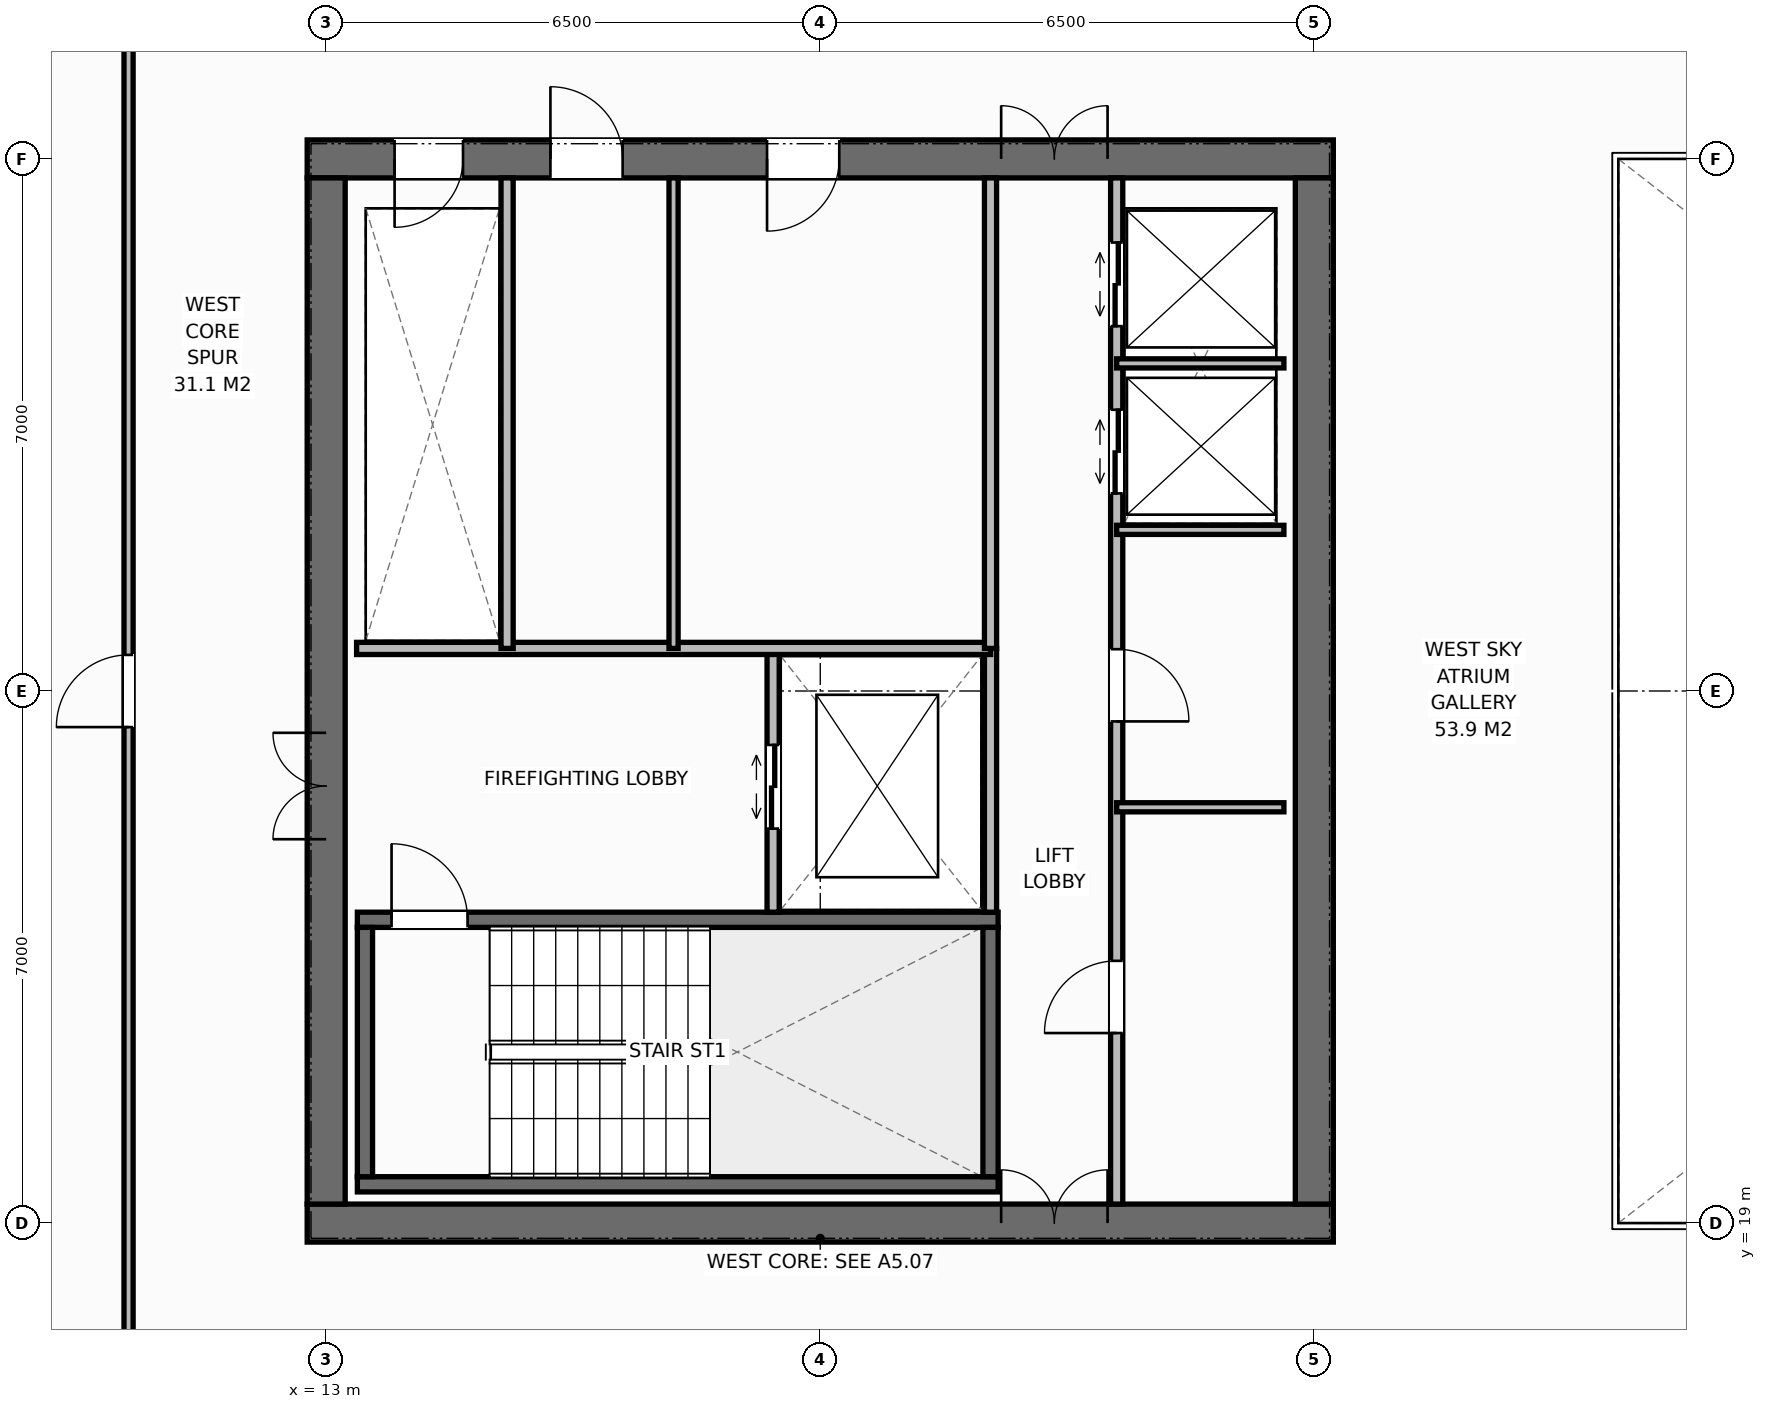
"""IFC4 building model, lengths in metres.
Left out: names, types, materials, properties, quantities, classifications, styles, units other than length and angle.
Written with IfcOpenShell. Run it as: python <this file> out.ifc"""

import sys

from ifc_helpers import new_model, si_unit, direction, frame, frame_2d, origin, place, context, subcontext, project, spatial, rectangle, extrude, element, fill, save


model = new_model("IFC4")
c1 = context("Model", 3, precision=1e-05, world=origin(), true_north=direction((0.0, 1.0)))
c2 = subcontext(c1, "Body", "Model", "MODEL_VIEW")
j1 = project(units=[si_unit("LENGTHUNIT", "METRE"), si_unit("PLANEANGLEUNIT", "RADIAN")], contexts=[c1])
p1 = place(None, origin())
s1 = spatial("IfcSite", under=j1, at=p1, CompositionType="ELEMENT")
p2 = place(p1, origin())
s2 = spatial("IfcBuilding", under=s1, at=p2, CompositionType="ELEMENT")
p3 = place(p2, frame((0.0, 0.0, 206.2)))
s3 = spatial("IfcBuildingStorey", under=s2, at=p3, CompositionType="ELEMENT", Elevation=206.2)
p4 = place(p3, frame((12.75, 19.0, 0.0), z_axis=(0.0, 0.0, 1.0), x_axis=(1.0, 0.0, 0.0)))
e1 = element("IfcWall", 1, at=p4, inside=s3, PredefinedType="SHEAR", context=c2, shape_type="SweptSolid", body=[
    extrude(rectangle(XDim=13.5, YDim=0.5, at=frame_2d((6.75, 0.0))), origin(), (0.0, 0.0, 1.0), 3.8),
])
p5 = place(p4, frame((9.13, 0.0, 0.0)))
e2 = element("IfcOpeningElement", 2, at=p5, cuts=e1, PredefinedType="OPENING", context=c2, shape_type="SweptSolid", body=[
    extrude(rectangle(XDim=1.4, YDim=2.2, at=frame_2d((0.7, 1.1))), frame((0.0, 0.26, 0.0), z_axis=(0.0, -1.0, 0.0), x_axis=(1.0, 0.0, 0.0)), (0.0, 0.0, 1.0), 0.52),
])
p6 = place(p3, frame((12.75, 33.0, 0.0), z_axis=(0.0, 0.0, 1.0), x_axis=(1.0, 0.0, 0.0)))
e3 = element("IfcWall", 3, at=p6, inside=s3, PredefinedType="SHEAR", context=c2, shape_type="SweptSolid", body=[
    extrude(rectangle(XDim=13.5, YDim=0.5, at=frame_2d((6.75, 0.0))), origin(), (0.0, 0.0, 1.0), 3.8),
])
p7 = place(p6, frame((1.15, 0.0, 0.0)))
e4 = element("IfcOpeningElement", 4, at=p7, cuts=e3, PredefinedType="OPENING", context=c2, shape_type="SweptSolid", body=[
    extrude(rectangle(XDim=0.9, YDim=2.15, at=frame_2d((0.45, 1.075))), frame((0.0, 0.26, 0.0), z_axis=(0.0, -1.0, 0.0), x_axis=(1.0, 0.0, 0.0)), (0.0, 0.0, 1.0), 0.52),
])
p8 = place(p6, frame((3.2, 0.0, 0.0)))
e5 = element("IfcOpeningElement", 5, at=p8, cuts=e3, PredefinedType="OPENING", context=c2, shape_type="SweptSolid", body=[
    extrude(rectangle(XDim=0.95, YDim=2.15, at=frame_2d((0.475, 1.075))), frame((0.0, 0.26, 0.0), z_axis=(0.0, -1.0, 0.0), x_axis=(1.0, 0.0, 0.0)), (0.0, 0.0, 1.0), 0.52),
])
p9 = place(p6, frame((6.05, 0.0, 0.0)))
e6 = element("IfcOpeningElement", 6, at=p9, cuts=e3, PredefinedType="OPENING", context=c2, shape_type="SweptSolid", body=[
    extrude(rectangle(XDim=0.95, YDim=2.15, at=frame_2d((0.475, 1.075))), frame((0.0, 0.26, 0.0), z_axis=(0.0, -1.0, 0.0), x_axis=(1.0, 0.0, 0.0)), (0.0, 0.0, 1.0), 0.52),
])
p10 = place(p6, frame((9.13, 0.0, 0.0)))
e7 = element("IfcOpeningElement", 7, at=p10, cuts=e3, PredefinedType="OPENING", context=c2, shape_type="SweptSolid", body=[
    extrude(rectangle(XDim=1.4, YDim=2.2, at=frame_2d((0.7, 1.1))), frame((0.0, 0.26, 0.0), z_axis=(0.0, -1.0, 0.0), x_axis=(1.0, 0.0, 0.0)), (0.0, 0.0, 1.0), 0.52),
])
p11 = place(p3, frame((13.0, 19.25, 0.0), z_axis=(0.0, 0.0, 1.0), x_axis=(0.0, 1.0, 0.0)))
e8 = element("IfcWall", 8, at=p11, inside=s3, PredefinedType="SHEAR", context=c2, shape_type="SweptSolid", body=[
    extrude(rectangle(XDim=13.5, YDim=0.5, at=frame_2d((6.75, 0.0))), origin(), (0.0, 0.0, 1.0), 3.8),
])
p12 = place(p11, frame((4.8, 0.0, 0.0)))
e9 = element("IfcOpeningElement", 9, at=p12, cuts=e8, PredefinedType="OPENING", context=c2, shape_type="SweptSolid", body=[
    extrude(rectangle(XDim=1.4, YDim=2.2, at=frame_2d((0.7, 1.1))), frame((0.0, 0.26, 0.0), z_axis=(0.0, -1.0, 0.0), x_axis=(1.0, 0.0, 0.0)), (0.0, 0.0, 1.0), 0.52),
])
p13 = place(p3, frame((26.0, 19.25, 0.0), z_axis=(0.0, 0.0, 1.0), x_axis=(0.0, 1.0, 0.0)))
e10 = element("IfcWall", 10, at=p13, inside=s3, PredefinedType="SHEAR", context=c2, shape_type="SweptSolid", body=[
    extrude(rectangle(XDim=13.5, YDim=0.5, at=frame_2d((6.75, 0.0))), origin(), (0.0, 0.0, 1.0), 3.8),
])
p14 = place(p3, frame((13.41, 19.51, 0.0), z_axis=(0.0, 0.0, 1.0), x_axis=(1.0, 0.0, 0.0)))
e11 = element("IfcWall", 11, at=p14, inside=s3, PredefinedType="SHEAR", context=c2, shape_type="SweptSolid", body=[
    extrude(rectangle(XDim=8.43, YDim=0.2, at=frame_2d((4.215, 0.0))), origin(), (0.0, 0.0, 1.0), 3.8),
])
p15 = place(p3, frame((13.41, 22.99, 0.0), z_axis=(0.0, 0.0, 1.0), x_axis=(1.0, 0.0, 0.0)))
e12 = element("IfcWall", 12, at=p15, inside=s3, PredefinedType="SHEAR", context=c2, shape_type="SweptSolid", body=[
    extrude(rectangle(XDim=8.43, YDim=0.2, at=frame_2d((4.215, 0.0))), origin(), (0.0, 0.0, 1.0), 3.8),
])
p16 = place(p15, frame((0.45, 0.0, 0.0)))
e13 = element("IfcOpeningElement", 13, at=p16, cuts=e12, PredefinedType="OPENING", context=c2, shape_type="SweptSolid", body=[
    extrude(rectangle(XDim=1.0, YDim=2.15, at=frame_2d((0.5, 1.075))), frame((0.0, 0.11, 0.0), z_axis=(0.0, -1.0, 0.0), x_axis=(1.0, 0.0, 0.0)), (0.0, 0.0, 1.0), 0.22),
])
for number, where, z_axis, x_axis in (
    (14, (13.51, 19.61, 0.0), (0.0, 0.0, 1.0), (0.0, 1.0, 0.0)),
    (15, (21.74, 19.61, 0.0), (0.0, 0.0, 1.0), (0.0, 1.0, 0.0)),
):
    element("IfcWall", number, at=place(p3, frame(where, z_axis=z_axis, x_axis=x_axis)), inside=s3, PredefinedType="SHEAR", context=c2, shape_type="SweptSolid", body=[
        extrude(rectangle(XDim=3.28, YDim=0.2, at=frame_2d((1.64, 0.0))), origin(), (0.0, 0.0, 1.0), 3.8),
    ])
p17 = place(p3, frame((21.74, 23.09, 0.0), z_axis=(0.0, 0.0, 1.0), x_axis=(0.0, 1.0, 0.0)))
e16 = element("IfcWall", 16, at=p17, inside=s3, PredefinedType="STANDARD", context=c2, shape_type="SweptSolid", body=[
    extrude(rectangle(XDim=3.47, YDim=0.16, at=frame_2d((1.735, 0.0))), origin(), (0.0, 0.0, 1.0), 3.58),
])
p18 = place(p3, frame((18.88, 23.09, 0.0), z_axis=(0.0, 0.0, 1.0), x_axis=(0.0, 1.0, 0.0)))
e17 = element("IfcWall", 17, at=p18, inside=s3, PredefinedType="STANDARD", context=c2, shape_type="SweptSolid", body=[
    extrude(rectangle(XDim=3.47, YDim=0.16, at=frame_2d((1.735, 0.0))), origin(), (0.0, 0.0, 1.0), 3.58),
])
p19 = place(p18, frame((1.1, 0.0, 0.0)))
e18 = element("IfcOpeningElement", 18, at=p19, cuts=e17, PredefinedType="OPENING", context=c2, shape_type="SweptSolid", body=[
    extrude(rectangle(XDim=1.1, YDim=2.2, at=frame_2d((0.55, 1.1))), frame((0.0, 0.09, 0.0), z_axis=(0.0, -1.0, 0.0), x_axis=(1.0, 0.0, 0.0)), (0.0, 0.0, 1.0), 0.18),
])
p20 = place(p3, frame((13.4, 26.56, 0.0), z_axis=(0.0, 0.0, 1.0), x_axis=(1.0, 0.0, 0.0)))
e19 = element("IfcWall", 19, at=p20, inside=s3, PredefinedType="STANDARD", context=c2, shape_type="SweptSolid", body=[
    extrude(rectangle(XDim=8.34, YDim=0.16, at=frame_2d((4.17, 0.0))), origin(), (0.0, 0.0, 1.0), 3.58),
])
p21 = place(p3, frame((15.38, 26.56, 0.0), z_axis=(0.0, 0.0, 1.0), x_axis=(0.0, 1.0, 0.0)))
e20 = element("IfcWall", 20, at=p21, inside=s3, PredefinedType="STANDARD", context=c2, shape_type="SweptSolid", body=[
    extrude(rectangle(XDim=6.19, YDim=0.16, at=frame_2d((3.095, 0.0))), origin(), (0.0, 0.0, 1.0), 3.58),
])
p22 = place(p3, frame((17.57, 26.56, 0.0), z_axis=(0.0, 0.0, 1.0), x_axis=(0.0, 1.0, 0.0)))
e21 = element("IfcWall", 21, at=p22, inside=s3, PredefinedType="PARTITIONING", context=c2, shape_type="SweptSolid", body=[
    extrude(rectangle(XDim=6.19, YDim=0.12, at=frame_2d((3.095, 0.0))), origin(), (0.0, 0.0, 1.0), 3.58),
])
p23 = place(p3, frame((21.74, 26.56, 0.0), z_axis=(0.0, 0.0, 1.0), x_axis=(0.0, 1.0, 0.0)))
e22 = element("IfcWall", 22, at=p23, inside=s3, PredefinedType="STANDARD", context=c2, shape_type="SweptSolid", body=[
    extrude(rectangle(XDim=6.19, YDim=0.16, at=frame_2d((3.095, 0.0))), origin(), (0.0, 0.0, 1.0), 3.58),
])
p24 = place(p3, frame((23.4, 19.25, 0.0), z_axis=(0.0, 0.0, 1.0), x_axis=(0.0, 1.0, 0.0)))
e23 = element("IfcWall", 23, at=p24, inside=s3, PredefinedType="STANDARD", context=c2, shape_type="SweptSolid", body=[
    extrude(rectangle(XDim=13.5, YDim=0.16, at=frame_2d((6.75, 0.0))), origin(), (0.0, 0.0, 1.0), 3.58),
])
p25 = place(p24, frame((2.25, 0.0, 0.0)))
e24 = element("IfcOpeningElement", 24, at=p25, cuts=e23, PredefinedType="OPENING", context=c2, shape_type="SweptSolid", body=[
    extrude(rectangle(XDim=0.95, YDim=2.15, at=frame_2d((0.475, 1.075))), frame((0.0, 0.09, 0.0), z_axis=(0.0, -1.0, 0.0), x_axis=(1.0, 0.0, 0.0)), (0.0, 0.0, 1.0), 0.18),
])
p26 = place(p24, frame((6.35, 0.0, 0.0)))
e25 = element("IfcOpeningElement", 25, at=p26, cuts=e23, PredefinedType="OPENING", context=c2, shape_type="SweptSolid", body=[
    extrude(rectangle(XDim=0.95, YDim=2.15, at=frame_2d((0.475, 1.075))), frame((0.0, 0.09, 0.0), z_axis=(0.0, -1.0, 0.0), x_axis=(1.0, 0.0, 0.0)), (0.0, 0.0, 1.0), 0.18),
])
p27 = place(p24, frame((9.35, 0.0, 0.0)))
e26 = element("IfcOpeningElement", 26, at=p27, cuts=e23, PredefinedType="OPENING", context=c2, shape_type="SweptSolid", body=[
    extrude(rectangle(XDim=1.1, YDim=2.2, at=frame_2d((0.55, 1.1))), frame((0.0, 0.09, 0.0), z_axis=(0.0, -1.0, 0.0), x_axis=(1.0, 0.0, 0.0)), (0.0, 0.0, 1.0), 0.18),
])
p28 = place(p24, frame((11.55, 0.0, 0.0)))
e27 = element("IfcOpeningElement", 27, at=p28, cuts=e23, PredefinedType="OPENING", context=c2, shape_type="SweptSolid", body=[
    extrude(rectangle(XDim=1.1, YDim=2.2, at=frame_2d((0.55, 1.1))), frame((0.0, 0.09, 0.0), z_axis=(0.0, -1.0, 0.0), x_axis=(1.0, 0.0, 0.0)), (0.0, 0.0, 1.0), 0.18),
])
for number, where, z_axis, x_axis in (
    (28, (23.4, 24.47, 0.0), (0.0, 0.0, 1.0), (1.0, 0.0, 0.0)),
    (29, (23.4, 28.12, 0.0), (0.0, 0.0, 1.0), (1.0, 0.0, 0.0)),
    (30, (23.4, 30.31, 0.0), (0.0, 0.0, 1.0), (1.0, 0.0, 0.0)),
):
    element("IfcWall", number, at=place(p3, frame(where, z_axis=z_axis, x_axis=x_axis)), inside=s3, PredefinedType="PARTITIONING", context=c2, shape_type="SweptSolid", body=[
        extrude(rectangle(XDim=2.2, YDim=0.12, at=frame_2d((1.1, 0.0))), origin(), (0.0, 0.0, 1.0), 3.58),
    ])
p29 = place(p3, frame((10.4, 16.5, 0.0), z_axis=(0.0, 0.0, 1.0), x_axis=(0.0, 1.0, 0.0)))
e31 = element("IfcWall", 31, at=p29, inside=s3, PredefinedType="PARTITIONING", context=c2, shape_type="SweptSolid", body=[
    extrude(rectangle(XDim=19.0, YDim=0.12, at=frame_2d((9.5, 0.0))), origin(), (0.0, 0.0, 1.0), 3.58),
])
p30 = place(p29, frame((9.025, 0.0, 0.0)))
e32 = element("IfcOpeningElement", 32, at=p30, cuts=e31, PredefinedType="OPENING", context=c2, shape_type="SweptSolid", body=[
    extrude(rectangle(XDim=0.95, YDim=2.15, at=frame_2d((0.475, 1.075))), frame((0.0, 0.07, 0.0), z_axis=(0.0, -1.0, 0.0), x_axis=(1.0, 0.0, 0.0)), (0.0, 0.0, 1.0), 0.14),
])
p31 = place(p16, origin())
e33 = element("IfcDoor", 33, at=p31, inside=s3, OperationType="SINGLE_SWING_LEFT", PredefinedType="DOOR", context=c2, shape_type="SweptSolid", body=[
    extrude(rectangle(XDim=1.0, YDim=2.15, at=frame_2d((0.5, 1.075))), frame((0.0, 0.025, 0.0), z_axis=(0.0, -1.0, 0.0), x_axis=(1.0, 0.0, 0.0)), (0.0, 0.0, 1.0), 0.05),
])
fill(e13, e33)
p32 = place(p12, origin())
e34 = element("IfcDoor", 34, at=p32, inside=s3, OperationType="DOUBLE_DOOR_SINGLE_SWING", PredefinedType="DOOR", context=c2, shape_type="SweptSolid", body=[
    extrude(rectangle(XDim=1.4, YDim=2.2, at=frame_2d((0.7, 1.1))), frame((0.0, 0.025, 0.0), z_axis=(0.0, -1.0, 0.0), x_axis=(1.0, 0.0, 0.0)), (0.0, 0.0, 1.0), 0.05),
])
fill(e9, e34)
p33 = place(p19, origin())
e35 = element("IfcDoor", 35, at=p33, inside=s3, OperationType="DOUBLE_DOOR_SLIDING", PredefinedType="DOOR", context=c2, shape_type="SweptSolid", body=[
    extrude(rectangle(XDim=1.1, YDim=2.2, at=frame_2d((0.55, 1.1))), frame((0.0, 0.025, 0.0), z_axis=(0.0, -1.0, 0.0), x_axis=(1.0, 0.0, 0.0)), (0.0, 0.0, 1.0), 0.05),
])
fill(e18, e35)
p34 = place(p7, origin())
e36 = element("IfcDoor", 36, at=p34, inside=s3, OperationType="SINGLE_SWING_RIGHT", PredefinedType="DOOR", context=c2, shape_type="SweptSolid", body=[
    extrude(rectangle(XDim=0.9, YDim=2.15, at=frame_2d((0.45, 1.075))), frame((0.0, -0.025, 0.0), z_axis=(0.0, -1.0, 0.0), x_axis=(1.0, 0.0, 0.0)), (0.0, 0.0, 1.0), 0.05),
])
fill(e4, e36)
p35 = place(p8, origin())
e37 = element("IfcDoor", 37, at=p35, inside=s3, OperationType="SINGLE_SWING_LEFT", PredefinedType="DOOR", context=c2, shape_type="SweptSolid", body=[
    extrude(rectangle(XDim=0.95, YDim=2.15, at=frame_2d((0.475, 1.075))), frame((0.0, -0.025, 0.0), z_axis=(0.0, -1.0, 0.0), x_axis=(1.0, 0.0, 0.0)), (0.0, 0.0, 1.0), 0.05),
])
fill(e5, e37)
p36 = place(p9, origin())
e38 = element("IfcDoor", 38, at=p36, inside=s3, OperationType="SINGLE_SWING_RIGHT", PredefinedType="DOOR", context=c2, shape_type="SweptSolid", body=[
    extrude(rectangle(XDim=0.95, YDim=2.15, at=frame_2d((0.475, 1.075))), frame((0.0, -0.025, 0.0), z_axis=(0.0, -1.0, 0.0), x_axis=(1.0, 0.0, 0.0)), (0.0, 0.0, 1.0), 0.05),
])
fill(e6, e38)
p37 = place(p5, origin())
e39 = element("IfcDoor", 39, at=p37, inside=s3, OperationType="DOUBLE_DOOR_SINGLE_SWING", PredefinedType="DOOR", context=c2, shape_type="SweptSolid", body=[
    extrude(rectangle(XDim=1.4, YDim=2.2, at=frame_2d((0.7, 1.1))), frame((0.0, 0.075, 0.0), z_axis=(0.0, -1.0, 0.0), x_axis=(1.0, 0.0, 0.0)), (0.0, 0.0, 1.0), 0.05),
])
fill(e2, e39)
p38 = place(p10, origin())
e40 = element("IfcDoor", 40, at=p38, inside=s3, OperationType="DOUBLE_DOOR_SINGLE_SWING", PredefinedType="DOOR", context=c2, shape_type="SweptSolid", body=[
    extrude(rectangle(XDim=1.4, YDim=2.2, at=frame_2d((0.7, 1.1))), frame((0.0, -0.025, 0.0), z_axis=(0.0, -1.0, 0.0), x_axis=(1.0, 0.0, 0.0)), (0.0, 0.0, 1.0), 0.05),
])
fill(e7, e40)
p39 = place(p25, origin())
e41 = element("IfcDoor", 41, at=p39, inside=s3, OperationType="SINGLE_SWING_LEFT", PredefinedType="DOOR", context=c2, shape_type="SweptSolid", body=[
    extrude(rectangle(XDim=0.95, YDim=2.15, at=frame_2d((0.475, 1.075))), frame((0.0, 0.025, 0.0), z_axis=(0.0, -1.0, 0.0), x_axis=(1.0, 0.0, 0.0)), (0.0, 0.0, 1.0), 0.05),
])
fill(e24, e41)
p40 = place(p26, origin())
e42 = element("IfcDoor", 42, at=p40, inside=s3, OperationType="SINGLE_SWING_RIGHT", PredefinedType="DOOR", context=c2, shape_type="SweptSolid", body=[
    extrude(rectangle(XDim=0.95, YDim=2.15, at=frame_2d((0.475, 1.075))), frame((0.0, 0.025, 0.0), z_axis=(0.0, -1.0, 0.0), x_axis=(1.0, 0.0, 0.0)), (0.0, 0.0, 1.0), 0.05),
])
fill(e25, e42)
p41 = place(p27, origin())
e43 = element("IfcDoor", 43, at=p41, inside=s3, OperationType="DOUBLE_DOOR_SLIDING", PredefinedType="DOOR", context=c2, shape_type="SweptSolid", body=[
    extrude(rectangle(XDim=1.1, YDim=2.2, at=frame_2d((0.55, 1.1))), frame((0.0, 0.025, 0.0), z_axis=(0.0, -1.0, 0.0), x_axis=(1.0, 0.0, 0.0)), (0.0, 0.0, 1.0), 0.05),
])
fill(e26, e43)
p42 = place(p28, origin())
e44 = element("IfcDoor", 44, at=p42, inside=s3, OperationType="DOUBLE_DOOR_SLIDING", PredefinedType="DOOR", context=c2, shape_type="SweptSolid", body=[
    extrude(rectangle(XDim=1.1, YDim=2.2, at=frame_2d((0.55, 1.1))), frame((0.0, 0.025, 0.0), z_axis=(0.0, -1.0, 0.0), x_axis=(1.0, 0.0, 0.0)), (0.0, 0.0, 1.0), 0.05),
])
fill(e27, e44)
p43 = place(p30, origin())
e45 = element("IfcDoor", 45, at=p43, inside=s3, OperationType="SINGLE_SWING_LEFT", PredefinedType="DOOR", context=c2, shape_type="SweptSolid", body=[
    extrude(rectangle(XDim=0.95, YDim=2.15, at=frame_2d((0.475, 1.075))), frame((0.0, 0.025, 0.0), z_axis=(0.0, -1.0, 0.0), x_axis=(1.0, 0.0, 0.0)), (0.0, 0.0, 1.0), 0.05),
])
fill(e32, e45)
save(model, sys.argv[1])
